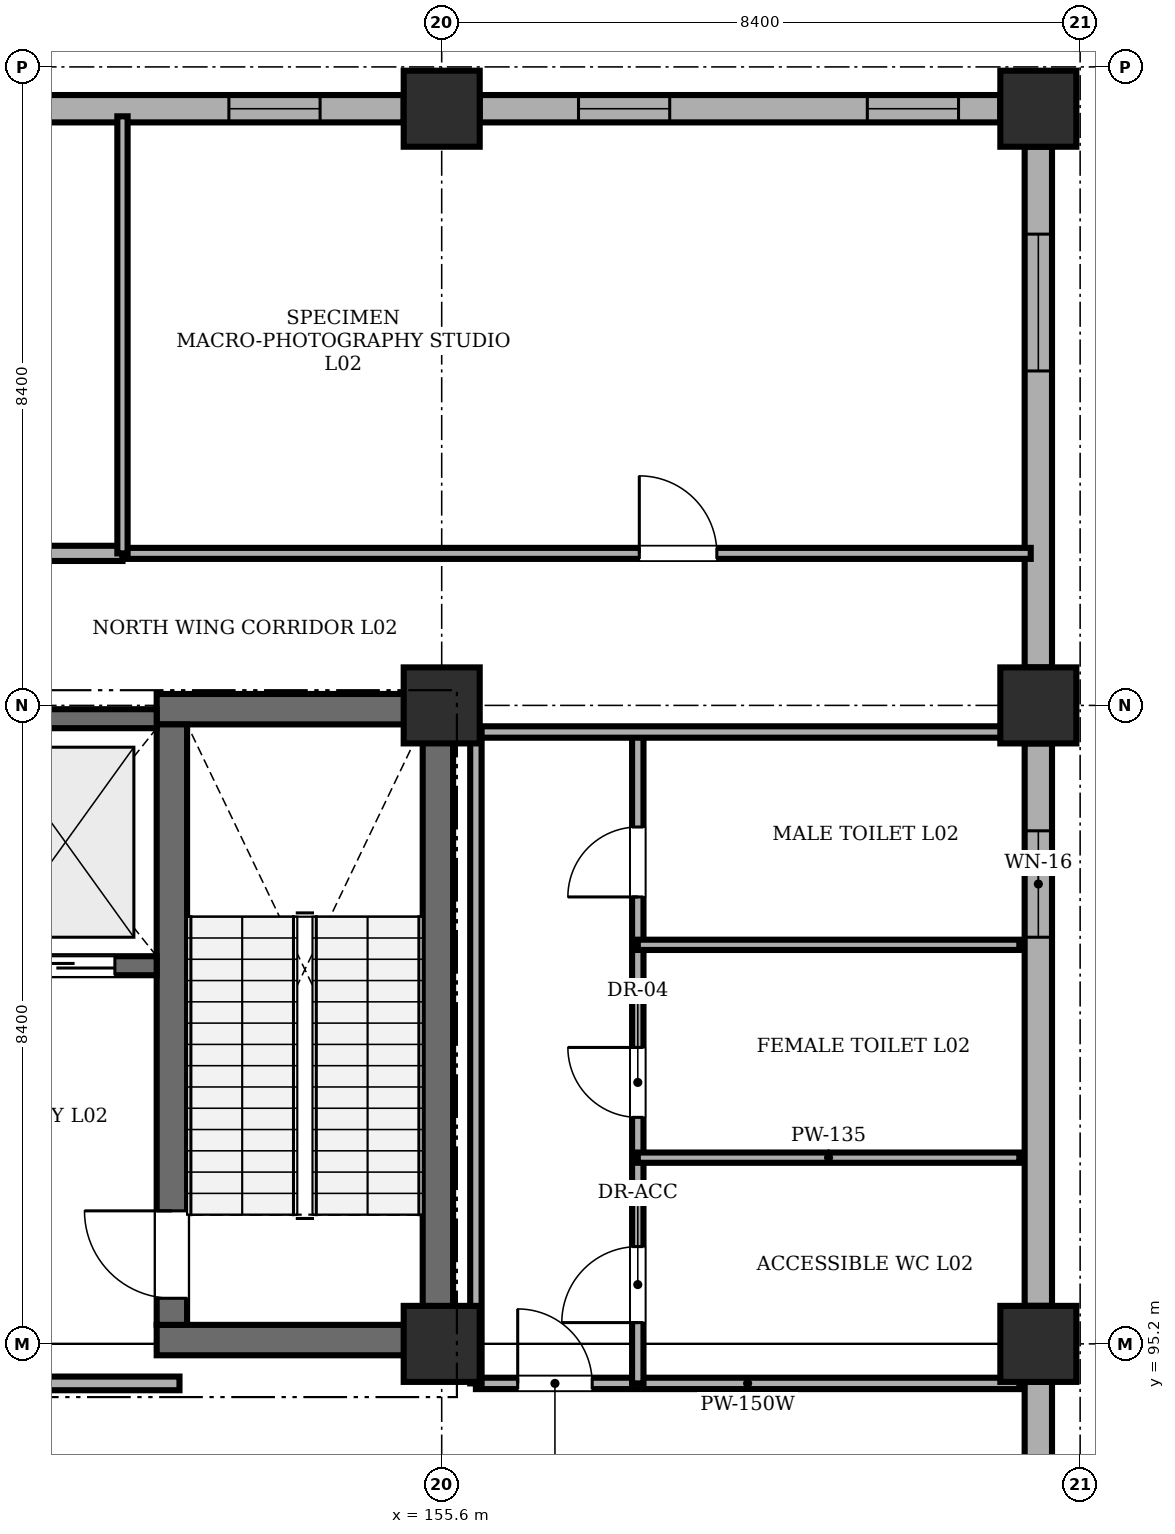
"""IFC4 building model, lengths in metres.
Left out: names, types, materials, properties, quantities, classifications, styles, units other than length and angle.
Written with IfcOpenShell. Run it as: python <this file> out.ifc"""

import sys

from ifc_helpers import new_model, si_unit, direction, frame, frame_2d, origin, origin_2d, place, context, subcontext, project, spatial, rectangle, extrude, element, fill, save


model = new_model("IFC4")
c1 = context("Model", 3, precision=1e-05, world=origin(), true_north=direction((0.0, 1.0)))
c2 = subcontext(c1, "Body", "Model", "MODEL_VIEW")
j1 = project(units=[si_unit("LENGTHUNIT", "METRE"), si_unit("PLANEANGLEUNIT", "RADIAN")], contexts=[c1])
p1 = place(None, origin())
s1 = spatial("IfcSite", under=j1, at=p1, CompositionType="ELEMENT")
p2 = place(p1, origin())
s2 = spatial("IfcBuilding", under=s1, at=p2, CompositionType="ELEMENT")
p3 = place(p2, frame((0.0, 0.0, 5.4)))
s3 = spatial("IfcBuildingStorey", under=s2, at=p3, CompositionType="ELEMENT", Elevation=5.4)
for number, where, z_axis, x_axis in (
    (1, (155.6, 95.2, 0.0), (0.0, 0.0, 1.0), (1.0, 0.0, 0.0)),
    (2, (155.6, 103.6, 0.0), (0.0, 0.0, 1.0), (1.0, 0.0, 0.0)),
    (3, (155.6, 111.45, 0.0), (0.0, 0.0, 1.0), (1.0, 0.0, 0.0)),
    (4, (163.45, 95.2, 0.0), (0.0, 0.0, 1.0), (1.0, 0.0, 0.0)),
    (5, (163.45, 103.6, 0.0), (0.0, 0.0, 1.0), (1.0, 0.0, 0.0)),
    (6, (163.45, 111.45, 0.0), (0.0, 0.0, 1.0), (1.0, 0.0, 0.0)),
):
    element("IfcColumn", number, at=place(p3, frame(where, z_axis=z_axis, x_axis=x_axis)), inside=s3, PredefinedType="COLUMN", context=c2, shape_type="SweptSolid", body=[
        extrude(rectangle(XDim=1.0, YDim=1.0, at=origin_2d()), origin(), (0.0, 0.0, 1.0), 4.58),
    ])
for number, where, z_axis, x_axis in (
    (7, (151.85, 95.25, 0.0), (0.0, 0.0, 1.0), (1.0, 0.0, 0.0)),
    (8, (151.85, 103.55, 0.0), (0.0, 0.0, 1.0), (1.0, 0.0, 0.0)),
):
    element("IfcWall", number, at=place(p3, frame(where, z_axis=z_axis, x_axis=x_axis)), inside=s3, PredefinedType="SHEAR", context=c2, shape_type="SweptSolid", body=[
        extrude(rectangle(XDim=3.9, YDim=0.4, at=frame_2d((1.95, 0.0))), origin(), (0.0, 0.0, 1.0), 4.58),
    ])
p4 = place(p3, frame((152.05, 95.45, 0.0), z_axis=(0.0, 0.0, 1.0), x_axis=(0.0, 1.0, 0.0)))
e9 = element("IfcWall", 9, at=p4, inside=s3, PredefinedType="SHEAR", context=c2, shape_type="SweptSolid", body=[
    extrude(rectangle(XDim=7.9, YDim=0.4, at=frame_2d((3.95, 0.0))), origin(), (0.0, 0.0, 1.0), 4.58),
])
p5 = place(p4, frame((0.35, 0.0, 0.0)))
e10 = element("IfcOpeningElement", 10, at=p5, cuts=e9, PredefinedType="OPENING", context=c2, shape_type="SweptSolid", body=[
    extrude(rectangle(XDim=1.15, YDim=2.15, at=frame_2d((0.575, 1.075))), frame((0.0, 0.21, 0.0), z_axis=(0.0, -1.0, 0.0), x_axis=(1.0, 0.0, 0.0)), (0.0, 0.0, 1.0), 0.42),
])
p6 = place(p3, frame((155.55, 95.45, 0.0), z_axis=(0.0, 0.0, 1.0), x_axis=(0.0, 1.0, 0.0)))
e11 = element("IfcWall", 11, at=p6, inside=s3, PredefinedType="SHEAR", context=c2, shape_type="SweptSolid", body=[
    extrude(rectangle(XDim=7.9, YDim=0.4, at=frame_2d((3.95, 0.0))), origin(), (0.0, 0.0, 1.0), 4.58),
])
p7 = place(p3, frame((149.45, 100.175, 0.0), z_axis=(0.0, 0.0, 1.0), x_axis=(1.0, 0.0, 0.0)))
e12 = element("IfcWall", 12, at=p7, inside=s3, PredefinedType="SHEAR", context=c2, shape_type="SweptSolid", body=[
    extrude(rectangle(XDim=2.4, YDim=0.25, at=frame_2d((1.2, 0.0))), origin(), (0.0, 0.0, 1.0), 4.58),
])
p8 = place(p7, frame((0.55, 0.0, 0.0)))
e13 = element("IfcOpeningElement", 13, at=p8, cuts=e12, PredefinedType="OPENING", context=c2, shape_type="SweptSolid", body=[
    extrude(rectangle(XDim=1.3, YDim=2.25, at=frame_2d((0.65, 1.125))), frame((0.0, 0.135, 0.0), z_axis=(0.0, -1.0, 0.0), x_axis=(1.0, 0.0, 0.0)), (0.0, 0.0, 1.0), 0.27),
])
p9 = place(p3, frame((149.45, 103.425, 0.0), z_axis=(0.0, 0.0, 1.0), x_axis=(1.0, 0.0, 0.0)))
e14 = element("IfcWall", 14, at=p9, inside=s3, PredefinedType="SHEAR", context=c2, shape_type="SweptSolid", body=[
    extrude(rectangle(XDim=2.4, YDim=0.25, at=frame_2d((1.2, 0.0))), origin(), (0.0, 0.0, 1.0), 4.58),
])
p10 = place(p3, frame((147.7, 111.45, 0.0), z_axis=(0.0, 0.0, 1.0), x_axis=(1.0, 0.0, 0.0)))
e15 = element("IfcWall", 15, at=p10, inside=s3, PredefinedType="STANDARD", context=c2, shape_type="SweptSolid", body=[
    extrude(rectangle(XDim=7.4, YDim=0.36, at=frame_2d((3.7, 0.0))), origin(), (0.0, 0.0, 1.0), 3.83),
])
p11 = place(p10, frame((1.3, 0.0, 1.1)))
e16 = element("IfcOpeningElement", 16, at=p11, cuts=e15, PredefinedType="OPENING", context=c2, shape_type="SweptSolid", body=[
    extrude(rectangle(XDim=1.2, YDim=1.5, at=frame_2d((0.6, 0.75))), frame((0.0, 0.19, 0.0), z_axis=(0.0, -1.0, 0.0), x_axis=(1.0, 0.0, 0.0)), (0.0, 0.0, 1.0), 0.38),
])
p12 = place(p10, frame((5.1, 0.0, 1.1)))
e17 = element("IfcOpeningElement", 17, at=p12, cuts=e15, PredefinedType="OPENING", context=c2, shape_type="SweptSolid", body=[
    extrude(rectangle(XDim=1.2, YDim=1.5, at=frame_2d((0.6, 0.75))), frame((0.0, 0.19, 0.0), z_axis=(0.0, -1.0, 0.0), x_axis=(1.0, 0.0, 0.0)), (0.0, 0.0, 1.0), 0.38),
])
p13 = place(p3, frame((156.1, 111.45, 0.0), z_axis=(0.0, 0.0, 1.0), x_axis=(1.0, 0.0, 0.0)))
e18 = element("IfcWall", 18, at=p13, inside=s3, PredefinedType="STANDARD", context=c2, shape_type="SweptSolid", body=[
    extrude(rectangle(XDim=6.85, YDim=0.36, at=frame_2d((3.425, 0.0))), origin(), (0.0, 0.0, 1.0), 3.83),
])
p14 = place(p13, frame((1.3, 0.0, 1.1)))
e19 = element("IfcOpeningElement", 19, at=p14, cuts=e18, PredefinedType="OPENING", context=c2, shape_type="SweptSolid", body=[
    extrude(rectangle(XDim=1.2, YDim=1.5, at=frame_2d((0.6, 0.75))), frame((0.0, 0.19, 0.0), z_axis=(0.0, -1.0, 0.0), x_axis=(1.0, 0.0, 0.0)), (0.0, 0.0, 1.0), 0.38),
])
p15 = place(p13, frame((5.1, 0.0, 1.1)))
e20 = element("IfcOpeningElement", 20, at=p15, cuts=e18, PredefinedType="OPENING", context=c2, shape_type="SweptSolid", body=[
    extrude(rectangle(XDim=1.2, YDim=1.5, at=frame_2d((0.6, 0.75))), frame((0.0, 0.19, 0.0), z_axis=(0.0, -1.0, 0.0), x_axis=(1.0, 0.0, 0.0)), (0.0, 0.0, 1.0), 0.38),
])
p16 = place(p3, frame((163.45, 94.7, 0.0), z_axis=(0.0, 0.0, 1.0), x_axis=(0.0, -1.0, 0.0)))
e21 = element("IfcWall", 21, at=p16, inside=s3, PredefinedType="STANDARD", context=c2, shape_type="SweptSolid", body=[
    extrude(rectangle(XDim=7.4, YDim=0.36, at=frame_2d((3.7, 0.0))), origin(), (0.0, 0.0, 1.0), 3.83),
])
p17 = place(p16, frame((4.2, 0.0, 1.1)))
e22 = element("IfcOpeningElement", 22, at=p17, cuts=e21, PredefinedType="OPENING", context=c2, shape_type="SweptSolid", body=[
    extrude(rectangle(XDim=1.8, YDim=1.8, at=frame_2d((0.9, 0.9))), frame((0.0, 0.19, 0.0), z_axis=(0.0, -1.0, 0.0), x_axis=(1.0, 0.0, 0.0)), (0.0, 0.0, 1.0), 0.38),
])
p18 = place(p3, frame((163.45, 103.1, 0.0), z_axis=(0.0, 0.0, 1.0), x_axis=(0.0, -1.0, 0.0)))
e23 = element("IfcWall", 23, at=p18, inside=s3, PredefinedType="STANDARD", context=c2, shape_type="SweptSolid", body=[
    extrude(rectangle(XDim=7.4, YDim=0.36, at=frame_2d((3.7, 0.0))), origin(), (0.0, 0.0, 1.0), 3.83),
])
p19 = place(p18, frame((1.15, 0.0, 1.1)))
e24 = element("IfcOpeningElement", 24, at=p19, cuts=e23, PredefinedType="OPENING", context=c2, shape_type="SweptSolid", body=[
    extrude(rectangle(XDim=1.4, YDim=1.4, at=frame_2d((0.7, 0.7))), frame((0.0, 0.19, 0.0), z_axis=(0.0, -1.0, 0.0), x_axis=(1.0, 0.0, 0.0)), (0.0, 0.0, 1.0), 0.38),
])
p20 = place(p3, frame((163.45, 110.95, 0.0), z_axis=(0.0, 0.0, 1.0), x_axis=(0.0, -1.0, 0.0)))
e25 = element("IfcWall", 25, at=p20, inside=s3, PredefinedType="STANDARD", context=c2, shape_type="SweptSolid", body=[
    extrude(rectangle(XDim=6.85, YDim=0.36, at=frame_2d((3.425, 0.0))), origin(), (0.0, 0.0, 1.0), 3.83),
])
p21 = place(p20, frame((1.15, 0.0, 1.1)))
e26 = element("IfcOpeningElement", 26, at=p21, cuts=e25, PredefinedType="OPENING", context=c2, shape_type="SweptSolid", body=[
    extrude(rectangle(XDim=1.8, YDim=1.8, at=frame_2d((0.9, 0.9))), frame((0.0, 0.19, 0.0), z_axis=(0.0, -1.0, 0.0), x_axis=(1.0, 0.0, 0.0)), (0.0, 0.0, 1.0), 0.38),
])
p22 = place(p3, frame((147.3, 94.68, 0.0), z_axis=(0.0, 0.0, 1.0), x_axis=(1.0, 0.0, 0.0)))
e27 = element("IfcWall", 27, at=p22, inside=s3, PredefinedType="STANDARD", context=c2, shape_type="SweptSolid", body=[
    extrude(rectangle(XDim=4.85, YDim=0.18, at=frame_2d((2.425, 0.0))), origin(), (0.0, 0.0, 1.0), 4.58),
])
p23 = place(p22, frame((1.6, 0.0, 0.0)))
e28 = element("IfcOpeningElement", 28, at=p23, cuts=e27, PredefinedType="OPENING", context=c2, shape_type="SweptSolid", body=[
    extrude(rectangle(XDim=1.15, YDim=2.15, at=frame_2d((0.575, 1.075))), frame((0.0, 0.1, 0.0), z_axis=(0.0, -1.0, 0.0), x_axis=(1.0, 0.0, 0.0)), (0.0, 0.0, 1.0), 0.2),
])
p24 = place(p3, frame((156.05, 94.68, 0.0), z_axis=(0.0, 0.0, 1.0), x_axis=(1.0, 0.0, 0.0)))
e29 = element("IfcWall", 29, at=p24, inside=s3, PredefinedType="PARTITIONING", context=c2, shape_type="SweptSolid", body=[
    extrude(rectangle(XDim=7.15, YDim=0.15, at=frame_2d((3.575, 0.0))), origin(), (0.0, 0.0, 1.0), 4.58),
])
p25 = place(p24, frame((0.55, 0.0, 0.0)))
e30 = element("IfcOpeningElement", 30, at=p25, cuts=e29, PredefinedType="OPENING", context=c2, shape_type="SweptSolid", body=[
    extrude(rectangle(XDim=0.98, YDim=2.12, at=frame_2d((0.49, 1.06))), frame((0.0, 0.085, 0.0), z_axis=(0.0, -1.0, 0.0), x_axis=(1.0, 0.0, 0.0)), (0.0, 0.0, 1.0), 0.17),
])
p26 = place(p3, frame((158.18, 94.68, 0.0), z_axis=(0.0, 0.0, 1.0), x_axis=(0.0, 1.0, 0.0)))
e31 = element("IfcWall", 31, at=p26, inside=s3, PredefinedType="PARTITIONING", context=c2, shape_type="SweptSolid", body=[
    extrude(rectangle(XDim=8.57, YDim=0.15, at=frame_2d((4.285, 0.0))), origin(), (0.0, 0.0, 1.0), 4.58),
])
p27 = place(p26, frame((0.8, 0.0, 0.0)))
e32 = element("IfcOpeningElement", 32, at=p27, cuts=e31, PredefinedType="OPENING", context=c2, shape_type="SweptSolid", body=[
    extrude(rectangle(XDim=1.0, YDim=2.12, at=frame_2d((0.5, 1.06))), frame((0.0, 0.085, 0.0), z_axis=(0.0, -1.0, 0.0), x_axis=(1.0, 0.0, 0.0)), (0.0, 0.0, 1.0), 0.17),
])
p28 = place(p26, frame((3.5, 0.0, 0.0)))
e33 = element("IfcOpeningElement", 33, at=p28, cuts=e31, PredefinedType="OPENING", context=c2, shape_type="SweptSolid", body=[
    extrude(rectangle(XDim=0.92, YDim=2.1, at=frame_2d((0.46, 1.05))), frame((0.0, 0.085, 0.0), z_axis=(0.0, -1.0, 0.0), x_axis=(1.0, 0.0, 0.0)), (0.0, 0.0, 1.0), 0.17),
])
p29 = place(p26, frame((6.4, 0.0, 0.0)))
e34 = element("IfcOpeningElement", 34, at=p29, cuts=e31, PredefinedType="OPENING", context=c2, shape_type="SweptSolid", body=[
    extrude(rectangle(XDim=0.92, YDim=2.1, at=frame_2d((0.46, 1.05))), frame((0.0, 0.085, 0.0), z_axis=(0.0, -1.0, 0.0), x_axis=(1.0, 0.0, 0.0)), (0.0, 0.0, 1.0), 0.17),
])
for number, where, z_axis, x_axis in (
    (35, (158.18, 97.65, 0.0), (0.0, 0.0, 1.0), (1.0, 0.0, 0.0)),
    (36, (158.18, 100.45, 0.0), (0.0, 0.0, 1.0), (1.0, 0.0, 0.0)),
):
    element("IfcWall", number, at=place(p3, frame(where, z_axis=z_axis, x_axis=x_axis)), inside=s3, PredefinedType="PARTITIONING", context=c2, shape_type="SweptSolid", body=[
        extrude(rectangle(XDim=5.02, YDim=0.135, at=frame_2d((2.51, 0.0))), origin(), (0.0, 0.0, 1.0), 4.58),
    ])
p30 = place(p3, frame((156.05, 103.25, 0.0), z_axis=(0.0, 0.0, 1.0), x_axis=(1.0, 0.0, 0.0)))
e37 = element("IfcWall", 37, at=p30, inside=s3, PredefinedType="PARTITIONING", context=c2, shape_type="SweptSolid", body=[
    extrude(rectangle(XDim=7.15, YDim=0.15, at=frame_2d((3.575, 0.0))), origin(), (0.0, 0.0, 1.0), 4.58),
])
p31 = place(p3, frame((156.05, 94.68, 0.0), z_axis=(0.0, 0.0, 1.0), x_axis=(0.0, 1.0, 0.0)))
e38 = element("IfcWall", 38, at=p31, inside=s3, PredefinedType="PARTITIONING", context=c2, shape_type="SweptSolid", body=[
    extrude(rectangle(XDim=8.57, YDim=0.15, at=frame_2d((4.285, 0.0))), origin(), (0.0, 0.0, 1.0), 4.58),
])
p32 = place(p3, frame((138.8, 105.6, 0.0), z_axis=(0.0, 0.0, 1.0), x_axis=(1.0, 0.0, 0.0)))
e39 = element("IfcWall", 39, at=p32, inside=s3, PredefinedType="SOLIDWALL", context=c2, shape_type="SweptSolid", body=[
    extrude(rectangle(XDim=12.6, YDim=0.2, at=frame_2d((6.3, 0.0))), origin(), (0.0, 0.0, 1.0), 4.58),
])
p33 = place(p32, frame((3.4, 0.0, 0.0)))
e40 = element("IfcOpeningElement", 40, at=p33, cuts=e39, PredefinedType="OPENING", context=c2, shape_type="SweptSolid", body=[
    extrude(rectangle(XDim=1.25, YDim=2.2, at=frame_2d((0.625, 1.1))), frame((0.0, 0.11, 0.0), z_axis=(0.0, -1.0, 0.0), x_axis=(1.0, 0.0, 0.0)), (0.0, 0.0, 1.0), 0.22),
])
p34 = place(p3, frame((151.4, 105.6, 0.0), z_axis=(0.0, 0.0, 1.0), x_axis=(1.0, 0.0, 0.0)))
e41 = element("IfcWall", 41, at=p34, inside=s3, PredefinedType="PARTITIONING", context=c2, shape_type="SweptSolid", body=[
    extrude(rectangle(XDim=11.95, YDim=0.145, at=frame_2d((5.975, 0.0))), origin(), (0.0, 0.0, 1.0), 4.58),
])
p35 = place(p34, frame((6.8, 0.0, 0.0)))
e42 = element("IfcOpeningElement", 42, at=p35, cuts=e41, PredefinedType="OPENING", context=c2, shape_type="SweptSolid", body=[
    extrude(rectangle(XDim=1.02, YDim=2.15, at=frame_2d((0.51, 1.075))), frame((0.0, 0.083, 0.0), z_axis=(0.0, -1.0, 0.0), x_axis=(1.0, 0.0, 0.0)), (0.0, 0.0, 1.0), 0.165),
])
p36 = place(p3, frame((151.4, 105.6, 0.0), z_axis=(0.0, 0.0, 1.0), x_axis=(0.0, 1.0, 0.0)))
e43 = element("IfcWall", 43, at=p36, inside=s3, PredefinedType="PARTITIONING", context=c2, shape_type="SweptSolid", body=[
    extrude(rectangle(XDim=5.75, YDim=0.135, at=frame_2d((2.875, 0.0))), origin(), (0.0, 0.0, 1.0), 4.03),
])
p37 = place(p12, origin())
e44 = element("IfcWindow", 44, at=p37, inside=s3, PartitioningType="SINGLE_PANEL", PredefinedType="WINDOW", context=c2, shape_type="SweptSolid", body=[
    extrude(rectangle(XDim=1.2, YDim=1.5, at=frame_2d((0.6, 0.75))), frame((0.0, 0.03, 0.0), z_axis=(0.0, -1.0, 0.0), x_axis=(1.0, 0.0, 0.0)), (0.0, 0.0, 1.0), 0.06),
])
fill(e17, e44)
p38 = place(p14, origin())
e45 = element("IfcWindow", 45, at=p38, inside=s3, PartitioningType="SINGLE_PANEL", PredefinedType="WINDOW", context=c2, shape_type="SweptSolid", body=[
    extrude(rectangle(XDim=1.2, YDim=1.5, at=frame_2d((0.6, 0.75))), frame((0.0, 0.03, 0.0), z_axis=(0.0, -1.0, 0.0), x_axis=(1.0, 0.0, 0.0)), (0.0, 0.0, 1.0), 0.06),
])
fill(e19, e45)
p39 = place(p15, origin())
e46 = element("IfcWindow", 46, at=p39, inside=s3, PartitioningType="SINGLE_PANEL", PredefinedType="WINDOW", context=c2, shape_type="SweptSolid", body=[
    extrude(rectangle(XDim=1.2, YDim=1.5, at=frame_2d((0.6, 0.75))), frame((0.0, 0.03, 0.0), z_axis=(0.0, -1.0, 0.0), x_axis=(1.0, 0.0, 0.0)), (0.0, 0.0, 1.0), 0.06),
])
fill(e20, e46)
p40 = place(p19, origin())
e47 = element("IfcWindow", 47, at=p40, inside=s3, PartitioningType="SINGLE_PANEL", PredefinedType="WINDOW", context=c2, shape_type="SweptSolid", body=[
    extrude(rectangle(XDim=1.4, YDim=1.4, at=frame_2d((0.7, 0.7))), frame((0.0, 0.03, 0.0), z_axis=(0.0, -1.0, 0.0), x_axis=(1.0, 0.0, 0.0)), (0.0, 0.0, 1.0), 0.06),
])
fill(e24, e47)
p41 = place(p21, origin())
e48 = element("IfcWindow", 48, at=p41, inside=s3, PartitioningType="DOUBLE_PANEL_VERTICAL", PredefinedType="WINDOW", context=c2, shape_type="SweptSolid", body=[
    extrude(rectangle(XDim=1.8, YDim=1.8, at=frame_2d((0.9, 0.9))), frame((0.0, 0.03, 0.0), z_axis=(0.0, -1.0, 0.0), x_axis=(1.0, 0.0, 0.0)), (0.0, 0.0, 1.0), 0.06),
])
fill(e26, e48)
p42 = place(p25, origin())
e49 = element("IfcDoor", 49, at=p42, inside=s3, OperationType="SINGLE_SWING_LEFT", PredefinedType="DOOR", context=c2, shape_type="SweptSolid", body=[
    extrude(rectangle(XDim=0.98, YDim=2.12, at=frame_2d((0.49, 1.06))), frame((0.0, 0.025, 0.0), z_axis=(0.0, -1.0, 0.0), x_axis=(1.0, 0.0, 0.0)), (0.0, 0.0, 1.0), 0.05),
])
fill(e30, e49)
p43 = place(p27, origin())
e50 = element("IfcDoor", 50, at=p43, inside=s3, OperationType="SINGLE_SWING_LEFT", PredefinedType="DOOR", context=c2, shape_type="SweptSolid", body=[
    extrude(rectangle(XDim=1.0, YDim=2.12, at=frame_2d((0.5, 1.06))), frame((0.0, 0.025, 0.0), z_axis=(0.0, -1.0, 0.0), x_axis=(1.0, 0.0, 0.0)), (0.0, 0.0, 1.0), 0.05),
])
fill(e32, e50)
p44 = place(p28, origin())
e51 = element("IfcDoor", 51, at=p44, inside=s3, OperationType="SINGLE_SWING_RIGHT", PredefinedType="DOOR", context=c2, shape_type="SweptSolid", body=[
    extrude(rectangle(XDim=0.92, YDim=2.1, at=frame_2d((0.46, 1.05))), frame((0.0, 0.025, 0.0), z_axis=(0.0, -1.0, 0.0), x_axis=(1.0, 0.0, 0.0)), (0.0, 0.0, 1.0), 0.05),
])
fill(e33, e51)
p45 = place(p29, origin())
e52 = element("IfcDoor", 52, at=p45, inside=s3, OperationType="SINGLE_SWING_LEFT", PredefinedType="DOOR", context=c2, shape_type="SweptSolid", body=[
    extrude(rectangle(XDim=0.92, YDim=2.1, at=frame_2d((0.46, 1.05))), frame((0.0, 0.025, 0.0), z_axis=(0.0, -1.0, 0.0), x_axis=(1.0, 0.0, 0.0)), (0.0, 0.0, 1.0), 0.05),
])
fill(e34, e52)
p46 = place(p35, origin())
e53 = element("IfcDoor", 53, at=p46, inside=s3, OperationType="SINGLE_SWING_LEFT", PredefinedType="DOOR", context=c2, shape_type="SweptSolid", body=[
    extrude(rectangle(XDim=1.02, YDim=2.15, at=frame_2d((0.51, 1.075))), frame((0.0, 0.025, 0.0), z_axis=(0.0, -1.0, 0.0), x_axis=(1.0, 0.0, 0.0)), (0.0, 0.0, 1.0), 0.05),
])
fill(e42, e53)
p47 = place(p5, origin())
e54 = element("IfcDoor", 54, at=p47, inside=s3, OperationType="SINGLE_SWING_RIGHT", PredefinedType="DOOR", context=c2, shape_type="SweptSolid", body=[
    extrude(rectangle(XDim=1.15, YDim=2.15, at=frame_2d((0.575, 1.075))), frame((0.0, 0.025, 0.0), z_axis=(0.0, -1.0, 0.0), x_axis=(1.0, 0.0, 0.0)), (0.0, 0.0, 1.0), 0.05),
])
fill(e10, e54)
p48 = place(p8, origin())
e55 = element("IfcDoor", 55, at=p48, inside=s3, OperationType="SLIDING_TO_LEFT", PredefinedType="DOOR", context=c2, shape_type="SweptSolid", body=[
    extrude(rectangle(XDim=1.3, YDim=2.25, at=frame_2d((0.65, 1.125))), frame((0.0, 0.025, 0.0), z_axis=(0.0, -1.0, 0.0), x_axis=(1.0, 0.0, 0.0)), (0.0, 0.0, 1.0), 0.05),
])
fill(e13, e55)
save(model, sys.argv[1])
